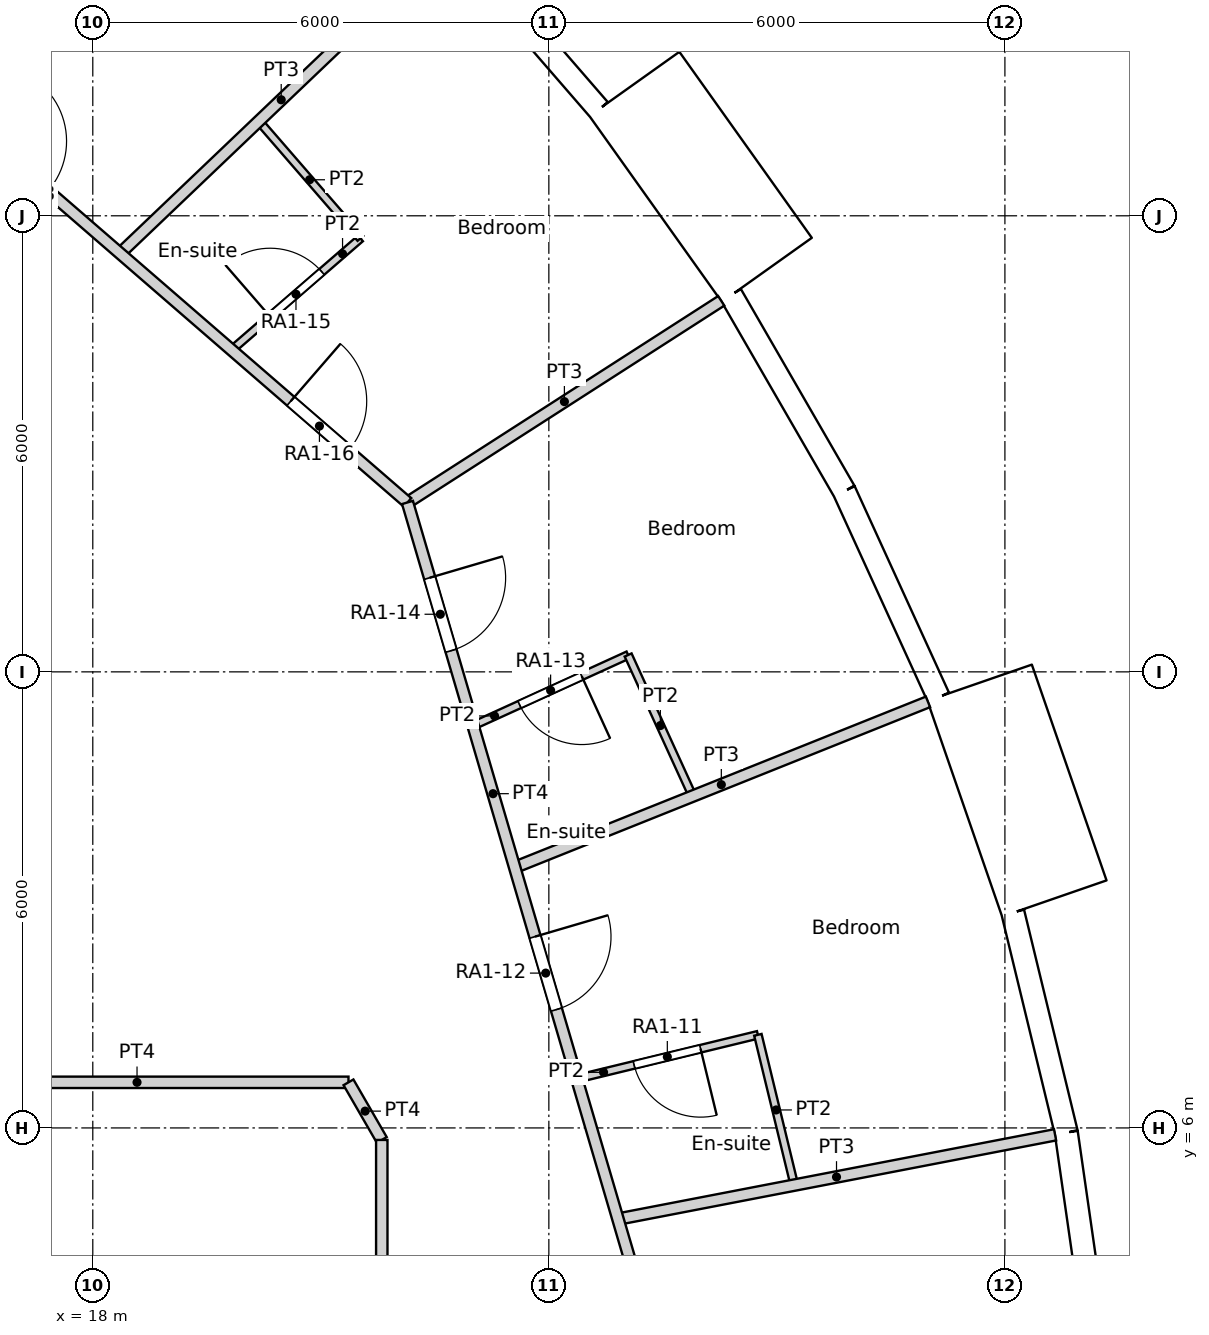
"""IFC4 building model, lengths in metres.
Left out: names, types, materials, properties, quantities, classifications, styles, units other than length and angle.
Written with IfcOpenShell. Run it as: python <this file> out.ifc"""

import sys

from ifc_helpers import new_model, si_unit, direction, frame, frame_2d, origin, origin_2d, place, context, subcontext, project, spatial, rectangle, circle, extrude, element, fill, save


model = new_model("IFC4")
c1 = context("Model", 3, precision=1e-05, world=origin(), true_north=direction((0.0, 1.0)))
c2 = subcontext(c1, "Body", "Model", "MODEL_VIEW")
j1 = project(units=[si_unit("LENGTHUNIT", "METRE"), si_unit("PLANEANGLEUNIT", "RADIAN")], contexts=[c1])
p1 = place(None, origin())
s1 = spatial("IfcSite", under=j1, at=p1, CompositionType="ELEMENT")
p2 = place(p1, origin())
s2 = spatial("IfcBuilding", under=s1, at=p2, CompositionType="ELEMENT")
p3 = place(p2, frame((0.0, 0.0, 28.2)))
s3 = spatial("IfcBuildingStorey", under=s2, at=p3, CompositionType="ELEMENT", Elevation=28.2)
for number, where, z_axis, x_axis in (
    (1, (29.728, 5.729, 0.0), (0.0, 0.0, 1.0), (1.0, 0.0, 0.0)),
    (2, (28.106, 11.252, 0.0), (0.0, 0.0, 1.0), (1.0, 0.0, 0.0)),
    (3, (25.469, 16.368, 0.0), (0.0, 0.0, 1.0), (1.0, 0.0, 0.0)),
):
    element("IfcColumn", number, at=place(p3, frame(where, z_axis=z_axis, x_axis=x_axis)), inside=s3, PredefinedType="COLUMN", context=c2, shape_type="SweptSolid", body=[
        extrude(circle(Radius=0.7, at=origin_2d()), origin(), (0.0, 0.0, 1.0), 3.6),
    ])
for number, where, z_axis, x_axis in (
    (4, (23.886, 5.661, 0.0), (0.0, 0.0, 1.0), (1.0, 0.0, 0.0)),
    (5, (21.937, 11.017, 0.0), (0.0, 0.0, 1.0), (1.0, 0.0, 0.0)),
    (6, (18.805, 15.779, 0.0), (0.0, 0.0, 1.0), (1.0, 0.0, 0.0)),
):
    element("IfcColumn", number, at=place(p3, frame(where, z_axis=z_axis, x_axis=x_axis)), inside=s3, PredefinedType="COLUMN", context=c2, shape_type="SweptSolid", body=[
        extrude(circle(Radius=0.75, at=origin_2d()), origin(), (0.0, 0.0, 1.0), 3.6),
    ])
p4 = place(p3, frame((17.986, 5.548, 0.0), z_axis=(0.0, 0.0, 1.0), x_axis=(1.0, 0.0, 0.0)))
e7 = element("IfcColumn", 7, at=p4, inside=s3, PredefinedType="COLUMN", context=c2, shape_type="SweptSolid", body=[
    extrude(circle(Radius=0.8, at=origin_2d()), origin(), (0.0, 0.0, 1.0), 3.6),
])
p5 = place(p3, frame((31.231, 2.988, 0.0), z_axis=(0.0, 0.0, 1.0), x_axis=(-0.142315996627, 0.989821275334, 0.0)))
e8 = element("IfcWall", 8, at=p5, inside=s3, PredefinedType="SOLIDWALL", context=c2, shape_type="SweptSolid", body=[
    extrude(rectangle(XDim=2.98, YDim=0.3, at=frame_2d((1.49, 0.0))), origin(), (0.0, 0.0, 1.0), 3.15),
])
p6 = place(p5, frame((1.49, 0.0, 1.55)))
e9 = element("IfcOpeningElement", 9, at=p6, cuts=e8, PredefinedType="OPENING", context=c2, shape_type="SweptSolid", body=[
    extrude(circle(Radius=0.9, at=origin_2d()), frame((0.0, 0.16, 0.0), z_axis=(0.0, -1.0, 0.0), x_axis=(1.0, 0.0, 0.0)), (0.0, 0.0, 1.0), 0.32),
])
p7 = place(p3, frame((30.807, 5.938, 0.0), z_axis=(0.0, 0.0, 1.0), x_axis=(-0.235743081534, 0.971815414319, 0.0)))
e10 = element("IfcWall", 10, at=p7, inside=s3, PredefinedType="SOLIDWALL", context=c2, shape_type="SweptSolid", body=[
    extrude(rectangle(XDim=2.979, YDim=0.3, at=frame_2d((1.49, 0.0))), origin(), (0.0, 0.0, 1.0), 3.15),
])
p8 = place(p7, frame((1.49, 0.0, 1.55)))
e11 = element("IfcOpeningElement", 11, at=p8, cuts=e10, PredefinedType="OPENING", context=c2, shape_type="SweptSolid", body=[
    extrude(circle(Radius=0.9, at=origin_2d()), frame((0.0, 0.16, 0.0), z_axis=(0.0, -1.0, 0.0), x_axis=(1.0, 0.0, 0.0)), (0.0, 0.0, 1.0), 0.32),
])
p9 = place(p3, frame((30.649, 9.021, -0.45), z_axis=(0.0, 0.0, 1.0), x_axis=(-0.327071431777, 0.944999618262, 0.0)))
e12 = element("IfcWall", 12, at=p9, inside=s3, PredefinedType="ELEMENTEDWALL", context=c2, shape_type="SweptSolid", body=[
    extrude(rectangle(XDim=3.0, YDim=1.45, at=frame_2d((1.5, 0.0))), origin(), (0.0, 0.0, 1.0), 3.6),
])
p10 = place(p9, frame((1.5, 0.0, 2.0)))
e13 = element("IfcOpeningElement", 13, at=p10, cuts=e12, PredefinedType="OPENING", context=c2, shape_type="SweptSolid", body=[
    extrude(circle(Radius=0.9, at=origin_2d()), frame((0.0, 0.735, 0.0), z_axis=(0.0, -1.0, 0.0), x_axis=(1.0, 0.0, 0.0)), (0.0, 0.0, 1.0), 1.47),
])
p11 = place(p3, frame((29.125, 11.666, 0.0), z_axis=(0.0, 0.0, 1.0), x_axis=(-0.415407317162, 0.909635509888, 0.0)))
e14 = element("IfcWall", 14, at=p11, inside=s3, PredefinedType="SOLIDWALL", context=c2, shape_type="SweptSolid", body=[
    extrude(rectangle(XDim=2.98, YDim=0.3, at=frame_2d((1.49, 0.0))), origin(), (0.0, 0.0, 1.0), 3.15),
])
p12 = place(p11, frame((1.49, 0.0, 1.55)))
e15 = element("IfcOpeningElement", 15, at=p12, cuts=e14, PredefinedType="OPENING", context=c2, shape_type="SweptSolid", body=[
    extrude(circle(Radius=0.9, at=origin_2d()), frame((0.0, 0.16, 0.0), z_axis=(0.0, -1.0, 0.0), x_axis=(1.0, 0.0, 0.0)), (0.0, 0.0, 1.0), 0.32),
])
p13 = place(p3, frame((27.887, 14.377, 0.0), z_axis=(0.0, 0.0, 1.0), x_axis=(-0.499999078476, 0.866025935826, 0.0)))
e16 = element("IfcWall", 16, at=p13, inside=s3, PredefinedType="SOLIDWALL", context=c2, shape_type="SweptSolid", body=[
    extrude(rectangle(XDim=2.979, YDim=0.3, at=frame_2d((1.49, 0.0))), origin(), (0.0, 0.0, 1.0), 3.15),
])
p14 = place(p13, frame((1.49, 0.0, 1.55)))
e17 = element("IfcOpeningElement", 17, at=p14, cuts=e16, PredefinedType="OPENING", context=c2, shape_type="SweptSolid", body=[
    extrude(circle(Radius=0.9, at=origin_2d()), frame((0.0, 0.16, 0.0), z_axis=(0.0, -1.0, 0.0), x_axis=(1.0, 0.0, 0.0)), (0.0, 0.0, 1.0), 0.32),
])
p15 = place(p3, frame((26.866, 17.29, -0.45), z_axis=(0.0, 0.0, 1.0), x_axis=(-0.580090570606, 0.814551981088, 0.0)))
e18 = element("IfcWall", 18, at=p15, inside=s3, PredefinedType="ELEMENTEDWALL", context=c2, shape_type="SweptSolid", body=[
    extrude(rectangle(XDim=3.0, YDim=1.45, at=frame_2d((1.5, 0.0))), origin(), (0.0, 0.0, 1.0), 3.6),
])
p16 = place(p15, frame((1.5, 0.0, 2.0)))
e19 = element("IfcOpeningElement", 19, at=p16, cuts=e18, PredefinedType="OPENING", context=c2, shape_type="SweptSolid", body=[
    extrude(circle(Radius=0.9, at=origin_2d()), frame((0.0, 0.735, 0.0), z_axis=(0.0, -1.0, 0.0), x_axis=(1.0, 0.0, 0.0)), (0.0, 0.0, 1.0), 1.47),
])
p17 = place(p3, frame((24.658, 19.399, 0.0), z_axis=(0.0, 0.0, 1.0), x_axis=(-0.654830712471, 0.755775587066, 0.0)))
e20 = element("IfcWall", 20, at=p17, inside=s3, PredefinedType="SOLIDWALL", context=c2, shape_type="SweptSolid", body=[
    extrude(rectangle(XDim=2.98, YDim=0.3, at=frame_2d((1.49, 0.0))), origin(), (0.0, 0.0, 1.0), 3.15),
])
p18 = place(p17, frame((1.49, 0.0, 1.55)))
e21 = element("IfcOpeningElement", 21, at=p18, cuts=e20, PredefinedType="OPENING", context=c2, shape_type="SweptSolid", body=[
    extrude(circle(Radius=0.9, at=origin_2d()), frame((0.0, 0.16, 0.0), z_axis=(0.0, -1.0, 0.0), x_axis=(1.0, 0.0, 0.0)), (0.0, 0.0, 1.0), 0.32),
])
p19 = place(p3, frame((21.802, -5.842, 0.0), z_axis=(0.0, 0.0, 1.0), x_axis=(0.0, 1.0, 0.0)))
e22 = element("IfcWall", 22, at=p19, inside=s3, PredefinedType="PARTITIONING", context=c2, shape_type="SweptSolid", body=[
    extrude(rectangle(XDim=11.684, YDim=0.15, at=frame_2d((5.842, 0.0))), origin(), (0.0, 0.0, 1.0), 3.15),
])
p20 = place(p3, frame((21.364, 6.6, 0.0), z_axis=(0.0, 0.0, 1.0), x_axis=(0.500277597875, -0.865865073245, 0.0)))
e23 = element("IfcWall", 23, at=p20, inside=s3, PredefinedType="PARTITIONING", context=c2, shape_type="SweptSolid", body=[
    extrude(rectangle(XDim=0.875, YDim=0.15, at=frame_2d((0.438, 0.0))), origin(), (0.0, 0.0, 1.0), 3.15),
])
p21 = place(p3, frame((15.8, 6.6, 0.0), z_axis=(0.0, 0.0, 1.0), x_axis=(1.0, 0.0, 0.0)))
e24 = element("IfcWall", 24, at=p21, inside=s3, PredefinedType="PARTITIONING", context=c2, shape_type="SweptSolid", body=[
    extrude(rectangle(XDim=5.564, YDim=0.15, at=frame_2d((2.782, 0.0))), origin(), (0.0, 0.0, 1.0), 3.15),
])
p22 = place(p3, frame((22.14, 14.229, 0.0), z_axis=(0.0, 0.0, 1.0), x_axis=(0.281780364869, -0.959478934617, 0.0)))
e25 = element("IfcWall", 25, at=p22, inside=s3, PredefinedType="PARTITIONING", context=c2, shape_type="SweptSolid", body=[
    extrude(rectangle(XDim=14.83, YDim=0.15, at=frame_2d((7.415, 0.0))), origin(), (0.0, 0.0, 1.0), 3.15),
])
p23 = place(p22, frame((10.816, 0.0, 0.0)))
e26 = element("IfcOpeningElement", 26, at=p23, cuts=e25, PredefinedType="OPENING", context=c2, shape_type="SweptSolid", body=[
    extrude(rectangle(XDim=1.0, YDim=2.1, at=frame_2d((0.5, 1.05))), frame((0.0, 0.075, 0.0), z_axis=(0.0, -1.0, 0.0), x_axis=(1.0, 0.0, 0.0)), (0.0, 0.0, 1.0), 0.15),
])
p24 = place(p22, frame((5.953, 0.0, 0.0)))
e27 = element("IfcOpeningElement", 27, at=p24, cuts=e25, PredefinedType="OPENING", context=c2, shape_type="SweptSolid", body=[
    extrude(rectangle(XDim=1.0, YDim=2.1, at=frame_2d((0.5, 1.05))), frame((0.0, 0.075, 0.0), z_axis=(0.0, -1.0, 0.0), x_axis=(1.0, 0.0, 0.0)), (0.0, 0.0, 1.0), 0.15),
])
p25 = place(p22, frame((1.033, 0.0, 0.0)))
e28 = element("IfcOpeningElement", 28, at=p25, cuts=e25, PredefinedType="OPENING", context=c2, shape_type="SweptSolid", body=[
    extrude(rectangle(XDim=1.0, YDim=2.1, at=frame_2d((0.5, 1.05))), frame((0.0, 0.075, 0.0), z_axis=(0.0, -1.0, 0.0), x_axis=(1.0, 0.0, 0.0)), (0.0, 0.0, 1.0), 0.15),
])
p26 = place(p3, frame((10.932, 23.939, 0.0), z_axis=(0.0, 0.0, 1.0), x_axis=(0.755838982892, -0.654757536757, 0.0)))
e29 = element("IfcWall", 29, at=p26, inside=s3, PredefinedType="PARTITIONING", context=c2, shape_type="SweptSolid", body=[
    extrude(rectangle(XDim=14.83, YDim=0.15, at=frame_2d((7.415, 0.0))), origin(), (0.0, 0.0, 1.0), 3.15),
])
p27 = place(p26, frame((12.796, 0.0, 0.0)))
e30 = element("IfcOpeningElement", 30, at=p27, cuts=e29, PredefinedType="OPENING", context=c2, shape_type="SweptSolid", body=[
    extrude(rectangle(XDim=1.0, YDim=2.1, at=frame_2d((0.5, 1.05))), frame((0.0, 0.075, 0.0), z_axis=(0.0, -1.0, 0.0), x_axis=(1.0, 0.0, 0.0)), (0.0, 0.0, 1.0), 0.15),
])
p28 = place(p26, frame((7.572, 0.0, 0.0)))
e31 = element("IfcOpeningElement", 31, at=p28, cuts=e29, PredefinedType="OPENING", context=c2, shape_type="SweptSolid", body=[
    extrude(rectangle(XDim=1.0, YDim=2.1, at=frame_2d((0.5, 1.05))), frame((0.0, 0.075, 0.0), z_axis=(0.0, -1.0, 0.0), x_axis=(1.0, 0.0, 0.0)), (0.0, 0.0, 1.0), 0.15),
])
p29 = place(p26, frame((1.033, 0.0, 0.0)))
e32 = element("IfcOpeningElement", 32, at=p29, cuts=e29, PredefinedType="OPENING", context=c2, shape_type="SweptSolid", body=[
    extrude(rectangle(XDim=1.0, YDim=2.1, at=frame_2d((0.5, 1.05))), frame((0.0, 0.075, 0.0), z_axis=(0.0, -1.0, 0.0), x_axis=(1.0, 0.0, 0.0)), (0.0, 0.0, 1.0), 0.15),
])
p30 = place(p3, frame((24.909, 4.8, 0.0), z_axis=(0.0, 0.0, 1.0), x_axis=(0.981919819649, 0.18929729998, 0.0)))
e33 = element("IfcWall", 33, at=p30, inside=s3, PredefinedType="PARTITIONING", context=c2, shape_type="SweptSolid", body=[
    extrude(rectangle(XDim=5.857, YDim=0.15, at=frame_2d((2.928, 0.0))), origin(), (0.0, 0.0, 1.0), 3.15),
])
p31 = place(p3, frame((26.75, 7.225, 0.0), z_axis=(0.0, 0.0, 1.0), x_axis=(0.23592286129, -0.97177178572, 0.0)))
e34 = element("IfcWall", 34, at=p31, inside=s3, PredefinedType="PARTITIONING", context=c2, shape_type="SweptSolid", body=[
    extrude(rectangle(XDim=2.034, YDim=0.1, at=frame_2d((1.017, 0.0))), origin(), (0.0, 0.0, 1.0), 3.15),
])
p32 = place(p3, frame((24.367, 6.646, 0.0), z_axis=(0.0, 0.0, 1.0), x_axis=(0.971720101056, 0.236135650006, 0.0)))
e35 = element("IfcWall", 35, at=p32, inside=s3, PredefinedType="PARTITIONING", context=c2, shape_type="SweptSolid", body=[
    extrude(rectangle(XDim=2.452, YDim=0.1, at=frame_2d((1.226, 0.0))), origin(), (0.0, 0.0, 1.0), 3.15),
])
p33 = place(p32, frame((0.776, 0.0, 0.0)))
e36 = element("IfcOpeningElement", 36, at=p33, cuts=e35, PredefinedType="OPENING", context=c2, shape_type="SweptSolid", body=[
    extrude(rectangle(XDim=0.9, YDim=2.04, at=frame_2d((0.45, 1.02))), frame((0.0, 0.05, 0.0), z_axis=(0.0, -1.0, 0.0), x_axis=(1.0, 0.0, 0.0)), (0.0, 0.0, 1.0), 0.1),
])
p34 = place(p3, frame((23.55, 9.427, 0.0), z_axis=(0.0, 0.0, 1.0), x_axis=(0.928307005382, 0.371814609393, 0.0)))
e37 = element("IfcWall", 37, at=p34, inside=s3, PredefinedType="PARTITIONING", context=c2, shape_type="SweptSolid", body=[
    extrude(rectangle(XDim=5.858, YDim=0.15, at=frame_2d((2.929, 0.0))), origin(), (0.0, 0.0, 1.0), 3.15),
])
p35 = place(p3, frame((25.043, 12.222, 0.0), z_axis=(0.0, 0.0, 1.0), x_axis=(0.41546015385, -0.909611378866, 0.0)))
e38 = element("IfcWall", 38, at=p35, inside=s3, PredefinedType="PARTITIONING", context=c2, shape_type="SweptSolid", body=[
    extrude(rectangle(XDim=2.042, YDim=0.1, at=frame_2d((1.021, 0.0))), origin(), (0.0, 0.0, 1.0), 3.15),
])
p36 = place(p3, frame((23.003, 11.291, 0.0), z_axis=(0.0, 0.0, 1.0), x_axis=(0.90975773562, 0.41513956988, 0.0)))
e39 = element("IfcWall", 39, at=p36, inside=s3, PredefinedType="PARTITIONING", context=c2, shape_type="SweptSolid", body=[
    extrude(rectangle(XDim=2.242, YDim=0.1, at=frame_2d((1.121, 0.0))), origin(), (0.0, 0.0, 1.0), 3.15),
])
p37 = place(p36, frame((0.671, 0.0, 0.0)))
e40 = element("IfcOpeningElement", 40, at=p37, cuts=e39, PredefinedType="OPENING", context=c2, shape_type="SweptSolid", body=[
    extrude(rectangle(XDim=0.9, YDim=2.04, at=frame_2d((0.45, 1.02))), frame((0.0, 0.05, 0.0), z_axis=(0.0, -1.0, 0.0), x_axis=(1.0, 0.0, 0.0)), (0.0, 0.0, 1.0), 0.1),
])
p38 = place(p3, frame((22.141, 14.229, 0.0), z_axis=(0.0, 0.0, 1.0), x_axis=(0.841265781699, 0.540621757371, 0.0)))
e41 = element("IfcWall", 41, at=p38, inside=s3, PredefinedType="PARTITIONING", context=c2, shape_type="SweptSolid", body=[
    extrude(rectangle(XDim=4.906, YDim=0.15, at=frame_2d((2.453, 0.0))), origin(), (0.0, 0.0, 1.0), 3.15),
])
p39 = place(p3, frame((19.826, 16.234, 0.0), z_axis=(0.0, 0.0, 1.0), x_axis=(0.755703447798, 0.654913963042, 0.0)))
e42 = element("IfcWall", 42, at=p39, inside=s3, PredefinedType="PARTITIONING", context=c2, shape_type="SweptSolid", body=[
    extrude(rectangle(XDim=2.243, YDim=0.1, at=frame_2d((1.122, 0.0))), origin(), (0.0, 0.0, 1.0), 3.15),
])
p40 = place(p39, frame((0.671, 0.0, 0.0)))
e43 = element("IfcOpeningElement", 43, at=p40, cuts=e42, PredefinedType="OPENING", context=c2, shape_type="SweptSolid", body=[
    extrude(rectangle(XDim=0.9, YDim=2.04, at=frame_2d((0.45, 1.02))), frame((0.0, 0.05, 0.0), z_axis=(0.0, -1.0, 0.0), x_axis=(1.0, 0.0, 0.0)), (0.0, 0.0, 1.0), 0.1),
])
p41 = place(p3, frame((20.184, 19.245, 0.0), z_axis=(0.0, 0.0, 1.0), x_axis=(0.655017058368, -0.755614090159, 0.0)))
e44 = element("IfcWall", 44, at=p41, inside=s3, PredefinedType="PARTITIONING", context=c2, shape_type="SweptSolid", body=[
    extrude(rectangle(XDim=2.041, YDim=0.1, at=frame_2d((1.021, 0.0))), origin(), (0.0, 0.0, 1.0), 3.15),
])
p42 = place(p3, frame((18.36, 17.505, 0.0), z_axis=(0.0, 0.0, 1.0), x_axis=(0.723686703731, 0.690128650937, 0.0)))
e45 = element("IfcWall", 45, at=p42, inside=s3, PredefinedType="PARTITIONING", context=c2, shape_type="SweptSolid", body=[
    extrude(rectangle(XDim=5.856, YDim=0.15, at=frame_2d((2.928, 0.0))), origin(), (0.0, 0.0, 1.0), 3.15),
])
p43 = place(p3, frame((16.168, 19.404, 0.0), z_axis=(0.0, 0.0, 1.0), x_axis=(0.618142414415, 0.786066126672, 0.0)))
e46 = element("IfcWall", 46, at=p43, inside=s3, PredefinedType="PARTITIONING", context=c2, shape_type="SweptSolid", body=[
    extrude(rectangle(XDim=2.453, YDim=0.1, at=frame_2d((1.226, 0.0))), origin(), (0.0, 0.0, 1.0), 3.15),
])
p44 = place(p43, frame((0.776, 0.0, 0.0)))
e47 = element("IfcOpeningElement", 47, at=p44, cuts=e46, PredefinedType="OPENING", context=c2, shape_type="SweptSolid", body=[
    extrude(rectangle(XDim=0.9, YDim=2.04, at=frame_2d((0.45, 1.02))), frame((0.0, 0.05, 0.0), z_axis=(0.0, -1.0, 0.0), x_axis=(1.0, 0.0, 0.0)), (0.0, 0.0, 1.0), 0.1),
])
p45 = place(p6, origin())
e48 = element("IfcWindow", 48, at=p45, inside=s3, PartitioningType="SINGLE_PANEL", PredefinedType="WINDOW", context=c2, shape_type="SweptSolid", body=[
    extrude(circle(Radius=0.9, at=origin_2d()), frame((0.0, 0.12, 0.0), z_axis=(0.0, -1.0, 0.0), x_axis=(1.0, 0.0, 0.0)), (0.0, 0.0, 1.0), 0.1),
])
fill(e9, e48)
p46 = place(p8, origin())
e49 = element("IfcWindow", 49, at=p46, inside=s3, PartitioningType="SINGLE_PANEL", PredefinedType="WINDOW", context=c2, shape_type="SweptSolid", body=[
    extrude(circle(Radius=0.9, at=origin_2d()), frame((0.0, 0.12, 0.0), z_axis=(0.0, -1.0, 0.0), x_axis=(1.0, 0.0, 0.0)), (0.0, 0.0, 1.0), 0.1),
])
fill(e11, e49)
p47 = place(p10, origin())
e50 = element("IfcWindow", 50, at=p47, inside=s3, PartitioningType="SINGLE_PANEL", PredefinedType="WINDOW", context=c2, shape_type="SweptSolid", body=[
    extrude(circle(Radius=0.9, at=origin_2d()), frame((0.0, 0.695, 0.0), z_axis=(0.0, -1.0, 0.0), x_axis=(1.0, 0.0, 0.0)), (0.0, 0.0, 1.0), 0.1),
])
fill(e13, e50)
p48 = place(p12, origin())
e51 = element("IfcWindow", 51, at=p48, inside=s3, PartitioningType="SINGLE_PANEL", PredefinedType="WINDOW", context=c2, shape_type="SweptSolid", body=[
    extrude(circle(Radius=0.9, at=origin_2d()), frame((0.0, 0.12, 0.0), z_axis=(0.0, -1.0, 0.0), x_axis=(1.0, 0.0, 0.0)), (0.0, 0.0, 1.0), 0.1),
])
fill(e15, e51)
p49 = place(p14, origin())
e52 = element("IfcWindow", 52, at=p49, inside=s3, PartitioningType="SINGLE_PANEL", PredefinedType="WINDOW", context=c2, shape_type="SweptSolid", body=[
    extrude(circle(Radius=0.9, at=origin_2d()), frame((0.0, 0.12, 0.0), z_axis=(0.0, -1.0, 0.0), x_axis=(1.0, 0.0, 0.0)), (0.0, 0.0, 1.0), 0.1),
])
fill(e17, e52)
p50 = place(p16, origin())
e53 = element("IfcWindow", 53, at=p50, inside=s3, PartitioningType="SINGLE_PANEL", PredefinedType="WINDOW", context=c2, shape_type="SweptSolid", body=[
    extrude(circle(Radius=0.9, at=origin_2d()), frame((0.0, 0.695, 0.0), z_axis=(0.0, -1.0, 0.0), x_axis=(1.0, 0.0, 0.0)), (0.0, 0.0, 1.0), 0.1),
])
fill(e19, e53)
p51 = place(p18, origin())
e54 = element("IfcWindow", 54, at=p51, inside=s3, PartitioningType="SINGLE_PANEL", PredefinedType="WINDOW", context=c2, shape_type="SweptSolid", body=[
    extrude(circle(Radius=0.9, at=origin_2d()), frame((0.0, 0.12, 0.0), z_axis=(0.0, -1.0, 0.0), x_axis=(1.0, 0.0, 0.0)), (0.0, 0.0, 1.0), 0.1),
])
fill(e21, e54)
p52 = place(p33, origin())
e55 = element("IfcDoor", 55, at=p52, inside=s3, OperationType="SINGLE_SWING_LEFT", PredefinedType="DOOR", context=c2, shape_type="SweptSolid", body=[
    extrude(rectangle(XDim=0.9, YDim=2.04, at=frame_2d((0.45, 1.02))), frame((0.0, 0.025, 0.0), z_axis=(0.0, -1.0, 0.0), x_axis=(1.0, 0.0, 0.0)), (0.0, 0.0, 1.0), 0.05),
])
fill(e36, e55)
p53 = place(p24, origin())
e56 = element("IfcDoor", 56, at=p53, inside=s3, OperationType="SINGLE_SWING_LEFT", PredefinedType="DOOR", context=c2, shape_type="SweptSolid", body=[
    extrude(rectangle(XDim=1.0, YDim=2.1, at=frame_2d((0.5, 1.05))), frame((0.0, 0.025, 0.0), z_axis=(0.0, -1.0, 0.0), x_axis=(1.0, 0.0, 0.0)), (0.0, 0.0, 1.0), 0.05),
])
fill(e27, e56)
p54 = place(p37, origin())
e57 = element("IfcDoor", 57, at=p54, inside=s3, OperationType="SINGLE_SWING_LEFT", PredefinedType="DOOR", context=c2, shape_type="SweptSolid", body=[
    extrude(rectangle(XDim=0.9, YDim=2.04, at=frame_2d((0.45, 1.02))), frame((0.0, 0.025, 0.0), z_axis=(0.0, -1.0, 0.0), x_axis=(1.0, 0.0, 0.0)), (0.0, 0.0, 1.0), 0.05),
])
fill(e40, e57)
p55 = place(p25, origin())
e58 = element("IfcDoor", 58, at=p55, inside=s3, OperationType="SINGLE_SWING_LEFT", PredefinedType="DOOR", context=c2, shape_type="SweptSolid", body=[
    extrude(rectangle(XDim=1.0, YDim=2.1, at=frame_2d((0.5, 1.05))), frame((0.0, 0.025, 0.0), z_axis=(0.0, -1.0, 0.0), x_axis=(1.0, 0.0, 0.0)), (0.0, 0.0, 1.0), 0.05),
])
fill(e28, e58)
p56 = place(p40, origin())
e59 = element("IfcDoor", 59, at=p56, inside=s3, OperationType="SINGLE_SWING_LEFT", PredefinedType="DOOR", context=c2, shape_type="SweptSolid", body=[
    extrude(rectangle(XDim=0.9, YDim=2.04, at=frame_2d((0.45, 1.02))), frame((0.0, 0.025, 0.0), z_axis=(0.0, -1.0, 0.0), x_axis=(1.0, 0.0, 0.0)), (0.0, 0.0, 1.0), 0.05),
])
fill(e43, e59)
p57 = place(p27, origin())
e60 = element("IfcDoor", 60, at=p57, inside=s3, OperationType="SINGLE_SWING_LEFT", PredefinedType="DOOR", context=c2, shape_type="SweptSolid", body=[
    extrude(rectangle(XDim=1.0, YDim=2.1, at=frame_2d((0.5, 1.05))), frame((0.0, 0.025, 0.0), z_axis=(0.0, -1.0, 0.0), x_axis=(1.0, 0.0, 0.0)), (0.0, 0.0, 1.0), 0.05),
])
fill(e30, e60)
save(model, sys.argv[1])
